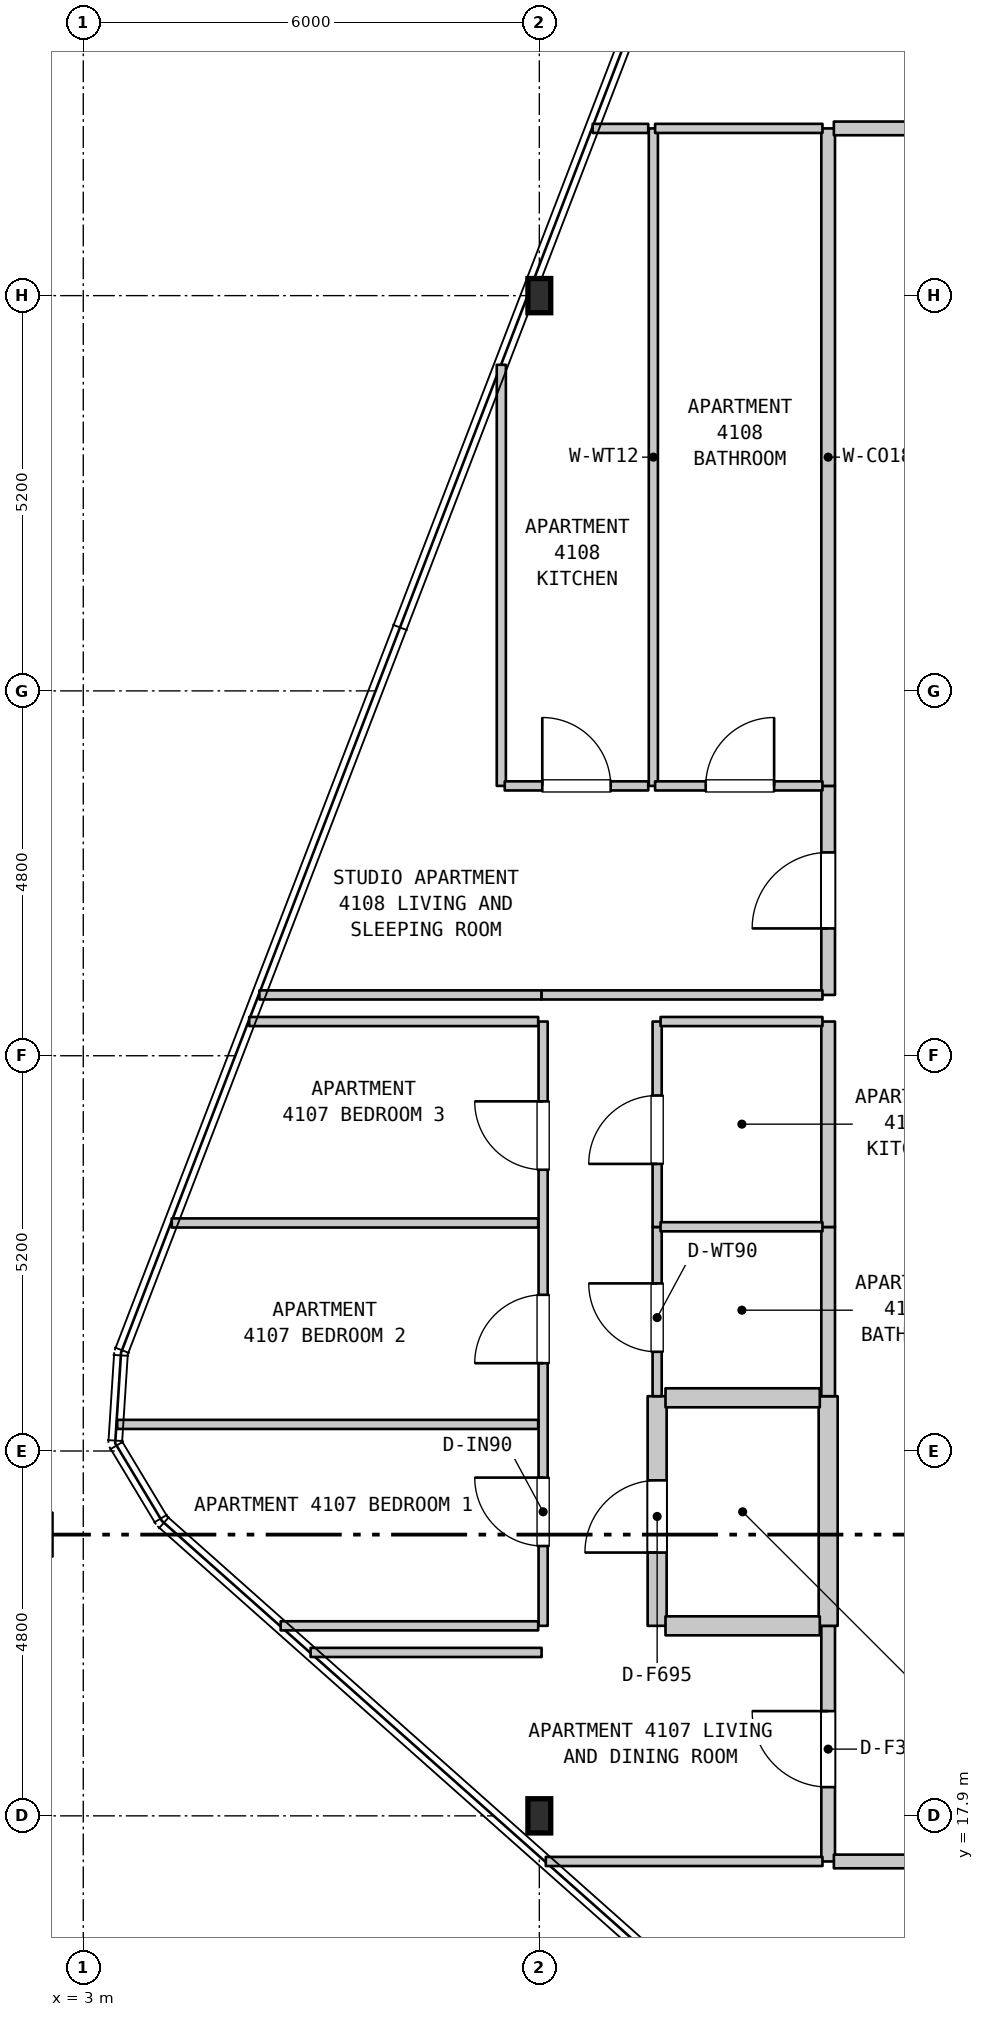
"""IFC4 building model, lengths in metres.
Left out: names, types, materials, properties, quantities, classifications, styles, units other than length and angle.
Written with IfcOpenShell. Run it as: python <this file> out.ifc"""

import sys

from ifc_helpers import new_model, si_unit, direction, frame, frame_2d, origin, origin_2d, place, context, subcontext, project, spatial, rectangle, i_section, extrude, element, fill, save


model = new_model("IFC4")
c1 = context("Model", 3, precision=1e-05, world=origin(), true_north=direction((0.0, 1.0)))
c2 = subcontext(c1, "Body", "Model", "MODEL_VIEW")
j1 = project(units=[si_unit("LENGTHUNIT", "METRE"), si_unit("PLANEANGLEUNIT", "RADIAN")], contexts=[c1])
p1 = place(None, origin())
s1 = spatial("IfcSite", under=j1, at=p1, CompositionType="ELEMENT")
p2 = place(p1, origin())
s2 = spatial("IfcBuilding", under=s1, at=p2, CompositionType="ELEMENT")
p3 = place(p2, frame((0.0, 0.0, 169.1)))
s3 = spatial("IfcBuildingStorey", under=s2, at=p3, CompositionType="ELEMENT", Elevation=169.1)
for number, where, z_axis, x_axis in (
    (1, (9.0, 17.9, 0.0), (0.0, 0.0, 1.0), (1.0, 0.0, 0.0)),
    (2, (9.0, 37.9, 0.0), (0.0, 0.0, 1.0), (1.0, 0.0, 0.0)),
):
    element("IfcColumn", number, at=place(p3, frame(where, z_axis=z_axis, x_axis=x_axis)), inside=s3, PredefinedType="COLUMN", context=c2, shape_type="SweptSolid", body=[
        extrude(i_section(OverallWidth=0.3, OverallDepth=0.45, WebThickness=0.014, FlangeThickness=0.026, FilletRadius=0.027, at=origin_2d()), origin(), (0.0, 0.0, 1.0), 3.7),
    ])
p4 = place(p3, frame((8.5, 31.45, 0.0), z_axis=(0.0, 0.0, 1.0), x_axis=(0.0, 1.0, 0.0)))
e3 = element("IfcWall", 3, at=p4, inside=s3, PredefinedType="PARTITIONING", context=c2, shape_type="SweptSolid", body=[
    extrude(rectangle(XDim=5.54, YDim=0.12, at=frame_2d((2.77, 0.0))), origin(), (0.0, 0.0, 1.0), 3.39),
])
p5 = place(p3, frame((9.05, 20.4, 0.0), z_axis=(0.0, 0.0, 1.0), x_axis=(0.0, 1.0, 0.0)))
e4 = element("IfcWall", 4, at=p5, inside=s3, PredefinedType="PARTITIONING", context=c2, shape_type="SweptSolid", body=[
    extrude(rectangle(XDim=7.95, YDim=0.12, at=frame_2d((3.975, 0.0))), origin(), (0.0, 0.0, 1.0), 2.79),
])
p6 = place(p5, frame((1.05, 0.0, 0.0)))
e5 = element("IfcOpeningElement", 5, at=p6, cuts=e4, PredefinedType="OPENING", context=c2, shape_type="SweptSolid", body=[
    extrude(rectangle(XDim=0.9, YDim=2.15, at=frame_2d((0.45, 1.075))), frame((0.0, 0.07, 0.0), z_axis=(0.0, -1.0, 0.0), x_axis=(1.0, 0.0, 0.0)), (0.0, 0.0, 1.0), 0.14),
])
p7 = place(p5, frame((3.455, 0.0, 0.0)))
e6 = element("IfcOpeningElement", 6, at=p7, cuts=e4, PredefinedType="OPENING", context=c2, shape_type="SweptSolid", body=[
    extrude(rectangle(XDim=0.9, YDim=2.15, at=frame_2d((0.45, 1.075))), frame((0.0, 0.07, 0.0), z_axis=(0.0, -1.0, 0.0), x_axis=(1.0, 0.0, 0.0)), (0.0, 0.0, 1.0), 0.14),
])
p8 = place(p5, frame((6.0, 0.0, 0.0)))
e7 = element("IfcOpeningElement", 7, at=p8, cuts=e4, PredefinedType="OPENING", context=c2, shape_type="SweptSolid", body=[
    extrude(rectangle(XDim=0.9, YDim=2.15, at=frame_2d((0.45, 1.075))), frame((0.0, 0.07, 0.0), z_axis=(0.0, -1.0, 0.0), x_axis=(1.0, 0.0, 0.0)), (0.0, 0.0, 1.0), 0.14),
])
p9 = place(p3, frame((10.5, 31.45, 0.0), z_axis=(0.0, 0.0, 1.0), x_axis=(0.0, 1.0, 0.0)))
e8 = element("IfcWall", 8, at=p9, inside=s3, PredefinedType="PARTITIONING", context=c2, shape_type="SweptSolid", body=[
    extrude(rectangle(XDim=8.65, YDim=0.12, at=frame_2d((4.325, 0.0))), origin(), (0.0, 0.0, 1.0), 3.39),
])
p10 = place(p3, frame((10.55, 20.4, 0.0), z_axis=(0.0, 0.0, 1.0), x_axis=(0.0, 1.0, 0.0)))
e9 = element("IfcWall", 9, at=p10, inside=s3, PredefinedType="STANDARD", context=c2, shape_type="SweptSolid", body=[
    extrude(rectangle(XDim=3.021, YDim=0.25, at=frame_2d((1.51, 0.0))), origin(), (0.0, 0.0, 1.0), 3.39),
])
p11 = place(p10, frame((0.964, 0.0, 0.0)))
e10 = element("IfcOpeningElement", 10, at=p11, cuts=e9, PredefinedType="OPENING", context=c2, shape_type="SweptSolid", body=[
    extrude(rectangle(XDim=0.95, YDim=2.15, at=frame_2d((0.475, 1.075))), frame((0.0, 0.135, 0.0), z_axis=(0.0, -1.0, 0.0), x_axis=(1.0, 0.0, 0.0)), (0.0, 0.0, 1.0), 0.27),
])
p12 = place(p3, frame((10.55, 23.421, 0.0), z_axis=(0.0, 0.0, 1.0), x_axis=(0.0, 1.0, 0.0)))
e11 = element("IfcWall", 11, at=p12, inside=s3, PredefinedType="PARTITIONING", context=c2, shape_type="SweptSolid", body=[
    extrude(rectangle(XDim=2.226, YDim=0.12, at=frame_2d((1.113, 0.0))), origin(), (0.0, 0.0, 1.0), 3.39),
])
p13 = place(p12, frame((0.584, 0.0, 0.0)))
e12 = element("IfcOpeningElement", 12, at=p13, cuts=e11, PredefinedType="OPENING", context=c2, shape_type="SweptSolid", body=[
    extrude(rectangle(XDim=0.9, YDim=2.1, at=frame_2d((0.45, 1.05))), frame((0.0, 0.07, 0.0), z_axis=(0.0, -1.0, 0.0), x_axis=(1.0, 0.0, 0.0)), (0.0, 0.0, 1.0), 0.14),
])
p14 = place(p3, frame((10.55, 25.647, 0.0), z_axis=(0.0, 0.0, 1.0), x_axis=(0.0, 1.0, 0.0)))
e13 = element("IfcWall", 13, at=p14, inside=s3, PredefinedType="PARTITIONING", context=c2, shape_type="SweptSolid", body=[
    extrude(rectangle(XDim=2.703, YDim=0.12, at=frame_2d((1.352, 0.0))), origin(), (0.0, 0.0, 1.0), 3.39),
])
p15 = place(p14, frame((0.83, 0.0, 0.0)))
e14 = element("IfcOpeningElement", 14, at=p15, cuts=e13, PredefinedType="OPENING", context=c2, shape_type="SweptSolid", body=[
    extrude(rectangle(XDim=0.9, YDim=2.15, at=frame_2d((0.45, 1.075))), frame((0.0, 0.07, 0.0), z_axis=(0.0, -1.0, 0.0), x_axis=(1.0, 0.0, 0.0)), (0.0, 0.0, 1.0), 0.14),
])
p16 = place(p3, frame((12.8, 17.3, 0.0), z_axis=(0.0, 0.0, 1.0), x_axis=(0.0, 1.0, 0.0)))
e15 = element("IfcWall", 15, at=p16, inside=s3, PredefinedType="STANDARD", context=c2, shape_type="SweptSolid", body=[
    extrude(rectangle(XDim=3.1, YDim=0.18, at=frame_2d((1.55, 0.0))), origin(), (0.0, 0.0, 1.0), 3.39),
])
p17 = place(p16, frame((0.978, 0.0, 0.0)))
e16 = element("IfcOpeningElement", 16, at=p17, cuts=e15, PredefinedType="OPENING", context=c2, shape_type="SweptSolid", body=[
    extrude(rectangle(XDim=1.0, YDim=2.15, at=frame_2d((0.5, 1.075))), frame((0.0, 0.1, 0.0), z_axis=(0.0, -1.0, 0.0), x_axis=(1.0, 0.0, 0.0)), (0.0, 0.0, 1.0), 0.2),
])
p18 = place(p3, frame((12.8, 20.4, 0.0), z_axis=(0.0, 0.0, 1.0), x_axis=(0.0, 1.0, 0.0)))
e17 = element("IfcWall", 17, at=p18, inside=s3, PredefinedType="STANDARD", context=c2, shape_type="SweptSolid", body=[
    extrude(rectangle(XDim=3.021, YDim=0.25, at=frame_2d((1.51, 0.0))), origin(), (0.0, 0.0, 1.0), 3.39),
])
p19 = place(p3, frame((12.8, 23.421, 0.0), z_axis=(0.0, 0.0, 1.0), x_axis=(0.0, 1.0, 0.0)))
e18 = element("IfcWall", 18, at=p19, inside=s3, PredefinedType="STANDARD", context=c2, shape_type="SweptSolid", body=[
    extrude(rectangle(XDim=2.226, YDim=0.18, at=frame_2d((1.113, 0.0))), origin(), (0.0, 0.0, 1.0), 3.39),
])
p20 = place(p3, frame((12.8, 25.647, 0.0), z_axis=(0.0, 0.0, 1.0), x_axis=(0.0, 1.0, 0.0)))
e19 = element("IfcWall", 19, at=p20, inside=s3, PredefinedType="STANDARD", context=c2, shape_type="SweptSolid", body=[
    extrude(rectangle(XDim=2.703, YDim=0.18, at=frame_2d((1.352, 0.0))), origin(), (0.0, 0.0, 1.0), 3.39),
])
p21 = place(p3, frame((12.8, 28.7, 0.0), z_axis=(0.0, 0.0, 1.0), x_axis=(0.0, 1.0, 0.0)))
e20 = element("IfcWall", 20, at=p21, inside=s3, PredefinedType="STANDARD", context=c2, shape_type="SweptSolid", body=[
    extrude(rectangle(XDim=2.75, YDim=0.18, at=frame_2d((1.375, 0.0))), origin(), (0.0, 0.0, 1.0), 3.39),
])
p22 = place(p21, frame((0.875, 0.0, 0.0)))
e21 = element("IfcOpeningElement", 21, at=p22, cuts=e20, PredefinedType="OPENING", context=c2, shape_type="SweptSolid", body=[
    extrude(rectangle(XDim=1.0, YDim=2.15, at=frame_2d((0.5, 1.075))), frame((0.0, 0.1, 0.0), z_axis=(0.0, -1.0, 0.0), x_axis=(1.0, 0.0, 0.0)), (0.0, 0.0, 1.0), 0.2),
])
p23 = place(p3, frame((12.8, 31.45, 0.0), z_axis=(0.0, 0.0, 1.0), x_axis=(0.0, 1.0, 0.0)))
e22 = element("IfcWall", 22, at=p23, inside=s3, PredefinedType="STANDARD", context=c2, shape_type="SweptSolid", body=[
    extrude(rectangle(XDim=8.65, YDim=0.18, at=frame_2d((4.325, 0.0))), origin(), (0.0, 0.0, 1.0), 3.39),
])
p24 = place(p3, frame((9.085, 17.3, 0.0), z_axis=(0.0, 0.0, 1.0), x_axis=(1.0, 0.0, 0.0)))
e23 = element("IfcWall", 23, at=p24, inside=s3, PredefinedType="PARTITIONING", context=c2, shape_type="SweptSolid", body=[
    extrude(rectangle(XDim=3.64, YDim=0.12, at=frame_2d((1.82, 0.0))), origin(), (0.0, 0.0, 1.0), 3.39),
])
p25 = place(p3, frame((12.875, 17.3, 0.0), z_axis=(0.0, 0.0, 1.0), x_axis=(1.0, 0.0, 0.0)))
e24 = element("IfcWall", 24, at=p25, inside=s3, PredefinedType="STANDARD", context=c2, shape_type="SweptSolid", body=[
    extrude(rectangle(XDim=7.35, YDim=0.18, at=frame_2d((3.675, 0.0))), origin(), (0.0, 0.0, 1.0), 3.39),
])
p26 = place(p25, frame((3.16, 0.0, 0.0)))
e25 = element("IfcOpeningElement", 25, at=p26, cuts=e24, PredefinedType="OPENING", context=c2, shape_type="SweptSolid", body=[
    extrude(rectangle(XDim=1.0, YDim=2.15, at=frame_2d((0.5, 1.075))), frame((0.0, 0.1, 0.0), z_axis=(0.0, -1.0, 0.0), x_axis=(1.0, 0.0, 0.0)), (0.0, 0.0, 1.0), 0.2),
])
p27 = place(p3, frame((5.991, 20.05, 0.0), z_axis=(0.0, 0.0, 1.0), x_axis=(1.0, 0.0, 0.0)))
e26 = element("IfcWall", 26, at=p27, inside=s3, PredefinedType="PARTITIONING", context=c2, shape_type="SweptSolid", body=[
    extrude(rectangle(XDim=3.039, YDim=0.12, at=frame_2d((1.52, 0.0))), origin(), (0.0, 0.0, 1.0), 3.39),
])
p28 = place(p3, frame((5.597, 20.4, 0.0), z_axis=(0.0, 0.0, 1.0), x_axis=(1.0, 0.0, 0.0)))
e27 = element("IfcWall", 27, at=p28, inside=s3, PredefinedType="PARTITIONING", context=c2, shape_type="SweptSolid", body=[
    extrude(rectangle(XDim=3.388, YDim=0.12, at=frame_2d((1.694, 0.0))), origin(), (0.0, 0.0, 1.0), 3.39),
])
p29 = place(p3, frame((10.66, 20.4, 0.0), z_axis=(0.0, 0.0, 1.0), x_axis=(1.0, 0.0, 0.0)))
e28 = element("IfcWall", 28, at=p29, inside=s3, PredefinedType="STANDARD", context=c2, shape_type="SweptSolid", body=[
    extrude(rectangle(XDim=2.03, YDim=0.25, at=frame_2d((1.015, 0.0))), origin(), (0.0, 0.0, 1.0), 3.39),
])
p30 = place(p3, frame((3.446, 23.05, 0.0), z_axis=(0.0, 0.0, 1.0), x_axis=(1.0, 0.0, 0.0)))
e29 = element("IfcWall", 29, at=p30, inside=s3, PredefinedType="PARTITIONING", context=c2, shape_type="SweptSolid", body=[
    extrude(rectangle(XDim=5.539, YDim=0.12, at=frame_2d((2.77, 0.0))), origin(), (0.0, 0.0, 1.0), 3.39),
])
p31 = place(p3, frame((10.66, 23.4, 0.0), z_axis=(0.0, 0.0, 1.0), x_axis=(1.0, 0.0, 0.0)))
e30 = element("IfcWall", 30, at=p31, inside=s3, PredefinedType="STANDARD", context=c2, shape_type="SweptSolid", body=[
    extrude(rectangle(XDim=2.03, YDim=0.25, at=frame_2d((1.015, 0.0))), origin(), (0.0, 0.0, 1.0), 3.39),
])
p32 = place(p3, frame((10.595, 25.65, 0.0), z_axis=(0.0, 0.0, 1.0), x_axis=(1.0, 0.0, 0.0)))
e31 = element("IfcWall", 31, at=p32, inside=s3, PredefinedType="PARTITIONING", context=c2, shape_type="SweptSolid", body=[
    extrude(rectangle(XDim=2.13, YDim=0.12, at=frame_2d((1.065, 0.0))), origin(), (0.0, 0.0, 1.0), 3.39),
])
p33 = place(p3, frame((4.164, 25.7, 0.0), z_axis=(0.0, 0.0, 1.0), x_axis=(1.0, 0.0, 0.0)))
e32 = element("IfcWall", 32, at=p33, inside=s3, PredefinedType="PARTITIONING", context=c2, shape_type="SweptSolid", body=[
    extrude(rectangle(XDim=4.821, YDim=0.12, at=frame_2d((2.411, 0.0))), origin(), (0.0, 0.0, 1.0), 3.39),
])
p34 = place(p3, frame((5.183, 28.35, 0.0), z_axis=(0.0, 0.0, 1.0), x_axis=(1.0, 0.0, 0.0)))
e33 = element("IfcWall", 33, at=p34, inside=s3, PredefinedType="PARTITIONING", context=c2, shape_type="SweptSolid", body=[
    extrude(rectangle(XDim=3.802, YDim=0.12, at=frame_2d((1.901, 0.0))), origin(), (0.0, 0.0, 1.0), 3.39),
])
p35 = place(p3, frame((10.595, 28.35, 0.0), z_axis=(0.0, 0.0, 1.0), x_axis=(1.0, 0.0, 0.0)))
e34 = element("IfcWall", 34, at=p35, inside=s3, PredefinedType="PARTITIONING", context=c2, shape_type="SweptSolid", body=[
    extrude(rectangle(XDim=2.13, YDim=0.12, at=frame_2d((1.065, 0.0))), origin(), (0.0, 0.0, 1.0), 3.39),
])
p36 = place(p3, frame((5.317, 28.7, 0.0), z_axis=(0.0, 0.0, 1.0), x_axis=(1.0, 0.0, 0.0)))
e35 = element("IfcWall", 35, at=p36, inside=s3, PredefinedType="PARTITIONING", context=c2, shape_type="SweptSolid", body=[
    extrude(rectangle(XDim=3.713, YDim=0.12, at=frame_2d((1.856, 0.0))), origin(), (0.0, 0.0, 1.0), 3.39),
])
p37 = place(p3, frame((9.03, 28.7, 0.0), z_axis=(0.0, 0.0, 1.0), x_axis=(1.0, 0.0, 0.0)))
e36 = element("IfcWall", 36, at=p37, inside=s3, PredefinedType="PARTITIONING", context=c2, shape_type="SweptSolid", body=[
    extrude(rectangle(XDim=3.695, YDim=0.12, at=frame_2d((1.848, 0.0))), origin(), (0.0, 0.0, 1.0), 3.39),
])
p38 = place(p3, frame((8.545, 31.45, 0.0), z_axis=(0.0, 0.0, 1.0), x_axis=(1.0, 0.0, 0.0)))
e37 = element("IfcWall", 37, at=p38, inside=s3, PredefinedType="PARTITIONING", context=c2, shape_type="SweptSolid", body=[
    extrude(rectangle(XDim=1.888, YDim=0.12, at=frame_2d((0.944, 0.0))), origin(), (0.0, 0.0, 1.0), 3.39),
])
p39 = place(p38, frame((0.494, 0.0, 0.0)))
e38 = element("IfcOpeningElement", 38, at=p39, cuts=e37, PredefinedType="OPENING", context=c2, shape_type="SweptSolid", body=[
    extrude(rectangle(XDim=0.9, YDim=2.15, at=frame_2d((0.45, 1.075))), frame((0.0, 0.07, 0.0), z_axis=(0.0, -1.0, 0.0), x_axis=(1.0, 0.0, 0.0)), (0.0, 0.0, 1.0), 0.14),
])
p40 = place(p3, frame((10.523, 31.45, 0.0), z_axis=(0.0, 0.0, 1.0), x_axis=(1.0, 0.0, 0.0)))
e39 = element("IfcWall", 39, at=p40, inside=s3, PredefinedType="PARTITIONING", context=c2, shape_type="SweptSolid", body=[
    extrude(rectangle(XDim=2.202, YDim=0.12, at=frame_2d((1.101, 0.0))), origin(), (0.0, 0.0, 1.0), 3.39),
])
p41 = place(p40, frame((0.666, 0.0, 0.0)))
e40 = element("IfcOpeningElement", 40, at=p41, cuts=e39, PredefinedType="OPENING", context=c2, shape_type="SweptSolid", body=[
    extrude(rectangle(XDim=0.9, YDim=2.1, at=frame_2d((0.45, 1.05))), frame((0.0, 0.07, 0.0), z_axis=(0.0, -1.0, 0.0), x_axis=(1.0, 0.0, 0.0)), (0.0, 0.0, 1.0), 0.14),
])
p42 = place(p3, frame((9.702, 40.1, 0.0), z_axis=(0.0, 0.0, 1.0), x_axis=(1.0, 0.0, 0.0)))
e41 = element("IfcWall", 41, at=p42, inside=s3, PredefinedType="PARTITIONING", context=c2, shape_type="SweptSolid", body=[
    extrude(rectangle(XDim=0.731, YDim=0.12, at=frame_2d((0.366, 0.0))), origin(), (0.0, 0.0, 1.0), 3.39),
])
p43 = place(p3, frame((10.523, 40.1, 0.0), z_axis=(0.0, 0.0, 1.0), x_axis=(1.0, 0.0, 0.0)))
e42 = element("IfcWall", 42, at=p43, inside=s3, PredefinedType="PARTITIONING", context=c2, shape_type="SweptSolid", body=[
    extrude(rectangle(XDim=2.202, YDim=0.12, at=frame_2d((1.101, 0.0))), origin(), (0.0, 0.0, 1.0), 3.39),
])
p44 = place(p3, frame((12.875, 40.1, 0.0), z_axis=(0.0, 0.0, 1.0), x_axis=(1.0, 0.0, 0.0)))
e43 = element("IfcWall", 43, at=p44, inside=s3, PredefinedType="STANDARD", context=c2, shape_type="SweptSolid", body=[
    extrude(rectangle(XDim=3.32, YDim=0.18, at=frame_2d((1.66, 0.0))), origin(), (0.0, 0.0, 1.0), 3.39),
])
p45 = place(p44, frame((1.071, 0.0, 0.0)))
e44 = element("IfcOpeningElement", 44, at=p45, cuts=e43, PredefinedType="OPENING", context=c2, shape_type="SweptSolid", body=[
    extrude(rectangle(XDim=1.0, YDim=2.15, at=frame_2d((0.5, 1.075))), frame((0.0, 0.1, 0.0), z_axis=(0.0, -1.0, 0.0), x_axis=(1.0, 0.0, 0.0)), (0.0, 0.0, 1.0), 0.2),
])
p46 = place(p6, origin())
e45 = element("IfcDoor", 45, at=p46, inside=s3, OperationType="SINGLE_SWING_RIGHT", PredefinedType="DOOR", context=c2, shape_type="SweptSolid", body=[
    extrude(rectangle(XDim=0.9, YDim=2.15, at=frame_2d((0.45, 1.075))), frame((0.0, 0.025, 0.0), z_axis=(0.0, -1.0, 0.0), x_axis=(1.0, 0.0, 0.0)), (0.0, 0.0, 1.0), 0.05),
])
fill(e5, e45)
p47 = place(p7, origin())
e46 = element("IfcDoor", 46, at=p47, inside=s3, OperationType="SINGLE_SWING_LEFT", PredefinedType="DOOR", context=c2, shape_type="SweptSolid", body=[
    extrude(rectangle(XDim=0.9, YDim=2.15, at=frame_2d((0.45, 1.075))), frame((0.0, 0.025, 0.0), z_axis=(0.0, -1.0, 0.0), x_axis=(1.0, 0.0, 0.0)), (0.0, 0.0, 1.0), 0.05),
])
fill(e6, e46)
p48 = place(p8, origin())
e47 = element("IfcDoor", 47, at=p48, inside=s3, OperationType="SINGLE_SWING_RIGHT", PredefinedType="DOOR", context=c2, shape_type="SweptSolid", body=[
    extrude(rectangle(XDim=0.9, YDim=2.15, at=frame_2d((0.45, 1.075))), frame((0.0, 0.025, 0.0), z_axis=(0.0, -1.0, 0.0), x_axis=(1.0, 0.0, 0.0)), (0.0, 0.0, 1.0), 0.05),
])
fill(e7, e47)
p49 = place(p11, origin())
e48 = element("IfcDoor", 48, at=p49, inside=s3, OperationType="SINGLE_SWING_LEFT", PredefinedType="DOOR", context=c2, shape_type="SweptSolid", body=[
    extrude(rectangle(XDim=0.95, YDim=2.15, at=frame_2d((0.475, 1.075))), frame((0.0, 0.025, 0.0), z_axis=(0.0, -1.0, 0.0), x_axis=(1.0, 0.0, 0.0)), (0.0, 0.0, 1.0), 0.05),
])
fill(e10, e48)
p50 = place(p13, origin())
e49 = element("IfcDoor", 49, at=p50, inside=s3, OperationType="SINGLE_SWING_RIGHT", PredefinedType="DOOR", context=c2, shape_type="SweptSolid", body=[
    extrude(rectangle(XDim=0.9, YDim=2.1, at=frame_2d((0.45, 1.05))), frame((0.0, 0.025, 0.0), z_axis=(0.0, -1.0, 0.0), x_axis=(1.0, 0.0, 0.0)), (0.0, 0.0, 1.0), 0.05),
])
fill(e12, e49)
p51 = place(p15, origin())
e50 = element("IfcDoor", 50, at=p51, inside=s3, OperationType="SINGLE_SWING_LEFT", PredefinedType="DOOR", context=c2, shape_type="SweptSolid", body=[
    extrude(rectangle(XDim=0.9, YDim=2.15, at=frame_2d((0.45, 1.075))), frame((0.0, 0.025, 0.0), z_axis=(0.0, -1.0, 0.0), x_axis=(1.0, 0.0, 0.0)), (0.0, 0.0, 1.0), 0.05),
])
fill(e14, e50)
p52 = place(p17, origin())
e51 = element("IfcDoor", 51, at=p52, inside=s3, OperationType="SINGLE_SWING_RIGHT", PredefinedType="DOOR", context=c2, shape_type="SweptSolid", body=[
    extrude(rectangle(XDim=1.0, YDim=2.15, at=frame_2d((0.5, 1.075))), frame((0.0, 0.025, 0.0), z_axis=(0.0, -1.0, 0.0), x_axis=(1.0, 0.0, 0.0)), (0.0, 0.0, 1.0), 0.05),
])
fill(e16, e51)
p53 = place(p22, origin())
e52 = element("IfcDoor", 52, at=p53, inside=s3, OperationType="SINGLE_SWING_LEFT", PredefinedType="DOOR", context=c2, shape_type="SweptSolid", body=[
    extrude(rectangle(XDim=1.0, YDim=2.15, at=frame_2d((0.5, 1.075))), frame((0.0, 0.025, 0.0), z_axis=(0.0, -1.0, 0.0), x_axis=(1.0, 0.0, 0.0)), (0.0, 0.0, 1.0), 0.05),
])
fill(e21, e52)
p54 = place(p39, origin())
e53 = element("IfcDoor", 53, at=p54, inside=s3, OperationType="SINGLE_SWING_LEFT", PredefinedType="DOOR", context=c2, shape_type="SweptSolid", body=[
    extrude(rectangle(XDim=0.9, YDim=2.15, at=frame_2d((0.45, 1.075))), frame((0.0, 0.025, 0.0), z_axis=(0.0, -1.0, 0.0), x_axis=(1.0, 0.0, 0.0)), (0.0, 0.0, 1.0), 0.05),
])
fill(e38, e53)
p55 = place(p41, origin())
e54 = element("IfcDoor", 54, at=p55, inside=s3, OperationType="SINGLE_SWING_RIGHT", PredefinedType="DOOR", context=c2, shape_type="SweptSolid", body=[
    extrude(rectangle(XDim=0.9, YDim=2.1, at=frame_2d((0.45, 1.05))), frame((0.0, 0.025, 0.0), z_axis=(0.0, -1.0, 0.0), x_axis=(1.0, 0.0, 0.0)), (0.0, 0.0, 1.0), 0.05),
])
fill(e40, e54)
save(model, sys.argv[1])
